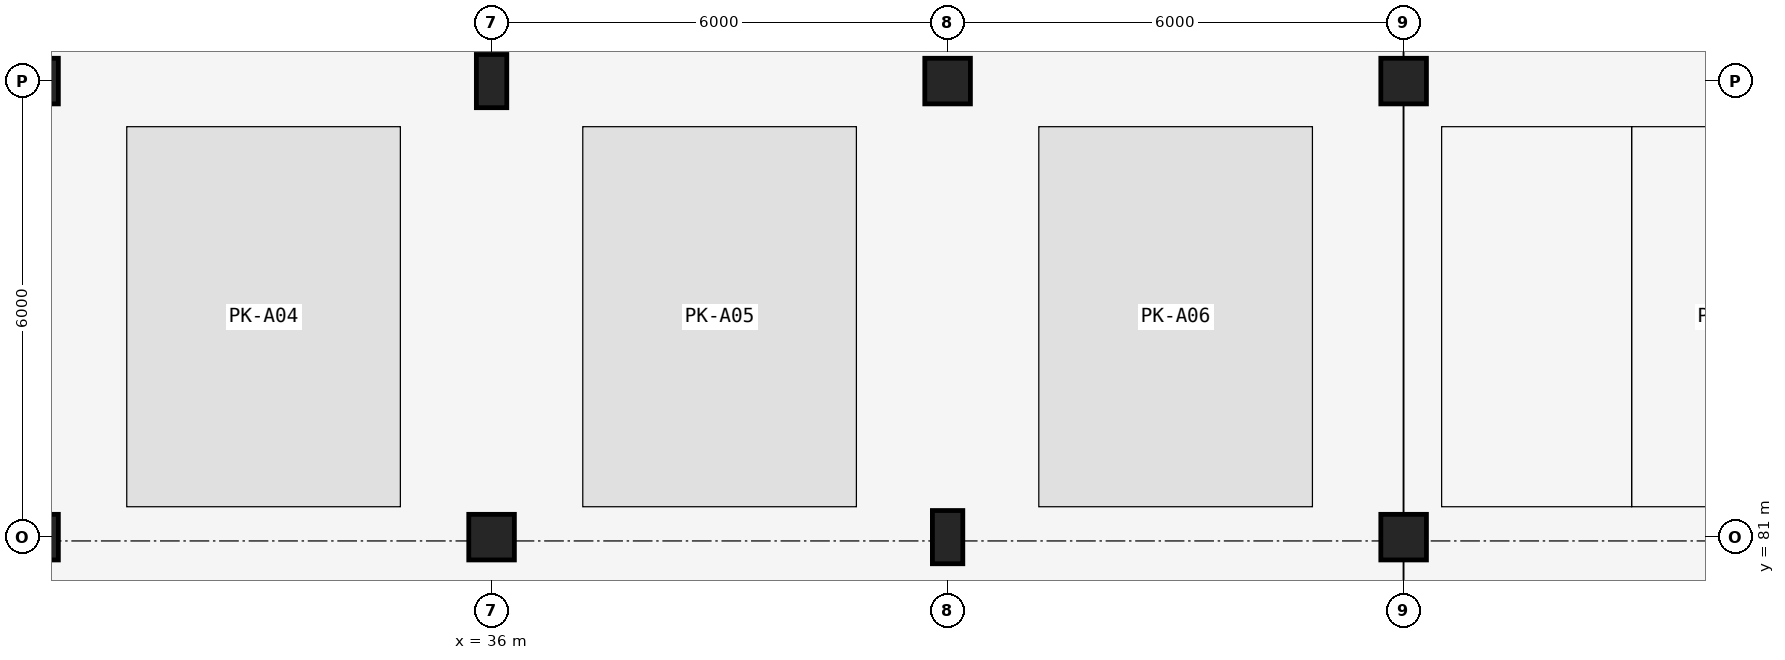
"""IFC4 building model, lengths in metres.
Left out: names, types, materials, properties, quantities, classifications, styles, units other than length and angle.
Written with IfcOpenShell. Run it as: python <this file> out.ifc"""

import sys

from ifc_helpers import new_model, si_unit, direction, frame, origin, origin_2d, place, context, subcontext, project, spatial, rectangle, extrude, element, save


model = new_model("IFC4")
c1 = context("Model", 3, precision=1e-05, world=origin(), true_north=direction((0.0, 1.0)))
c2 = subcontext(c1, "Body", "Model", "MODEL_VIEW")
j1 = project(units=[si_unit("LENGTHUNIT", "METRE"), si_unit("PLANEANGLEUNIT", "RADIAN")], contexts=[c1])
p1 = place(None, origin())
s1 = spatial("IfcSite", under=j1, at=p1, CompositionType="ELEMENT")
p2 = place(p1, origin())
s2 = spatial("IfcBuilding", under=s1, at=p2, CompositionType="ELEMENT")
p3 = place(p2, frame((0.0, 0.0, -4.5)))
s3 = spatial("IfcBuildingStorey", under=s2, at=p3, CompositionType="ELEMENT", Elevation=-4.5)
for number, where, z_axis, x_axis in (
    (1, (30.0, 81.0, 0.0), (0.0, 0.0, 1.0), (1.0, 0.0, 0.0)),
    (2, (30.0, 87.0, 0.0), (0.0, 0.0, 1.0), (1.0, 0.0, 0.0)),
    (3, (36.0, 81.0, 0.0), (0.0, 0.0, 1.0), (1.0, 0.0, 0.0)),
):
    element("IfcColumn", number, at=place(p3, frame(where, z_axis=z_axis, x_axis=x_axis)), inside=s3, PredefinedType="COLUMN", context=c2, shape_type="SweptSolid", body=[
        extrude(rectangle(XDim=0.6, YDim=0.6, at=origin_2d()), origin(), (0.0, 0.0, 1.0), 4.5),
    ])
for number, where, z_axis, x_axis in (
    (4, (36.0, 87.0, 0.0), (0.0, 0.0, 1.0), (1.0, 0.0, 0.0)),
    (5, (42.0, 81.0, 0.0), (0.0, 0.0, 1.0), (1.0, 0.0, 0.0)),
):
    element("IfcColumn", number, at=place(p3, frame(where, z_axis=z_axis, x_axis=x_axis)), inside=s3, PredefinedType="COLUMN", context=c2, shape_type="SweptSolid", body=[
        extrude(rectangle(XDim=0.4, YDim=0.7, at=origin_2d()), origin(), (0.0, 0.0, 1.0), 4.5),
    ])
for number, where, z_axis, x_axis in (
    (6, (42.0, 87.0, 0.0), (0.0, 0.0, 1.0), (1.0, 0.0, 0.0)),
    (7, (48.0, 81.0, 0.0), (0.0, 0.0, 1.0), (1.0, 0.0, 0.0)),
    (8, (48.0, 87.0, 0.0), (0.0, 0.0, 1.0), (1.0, 0.0, 0.0)),
):
    element("IfcColumn", number, at=place(p3, frame(where, z_axis=z_axis, x_axis=x_axis)), inside=s3, PredefinedType="COLUMN", context=c2, shape_type="SweptSolid", body=[
        extrude(rectangle(XDim=0.6, YDim=0.6, at=origin_2d()), origin(), (0.0, 0.0, 1.0), 4.5),
    ])
save(model, sys.argv[1])
